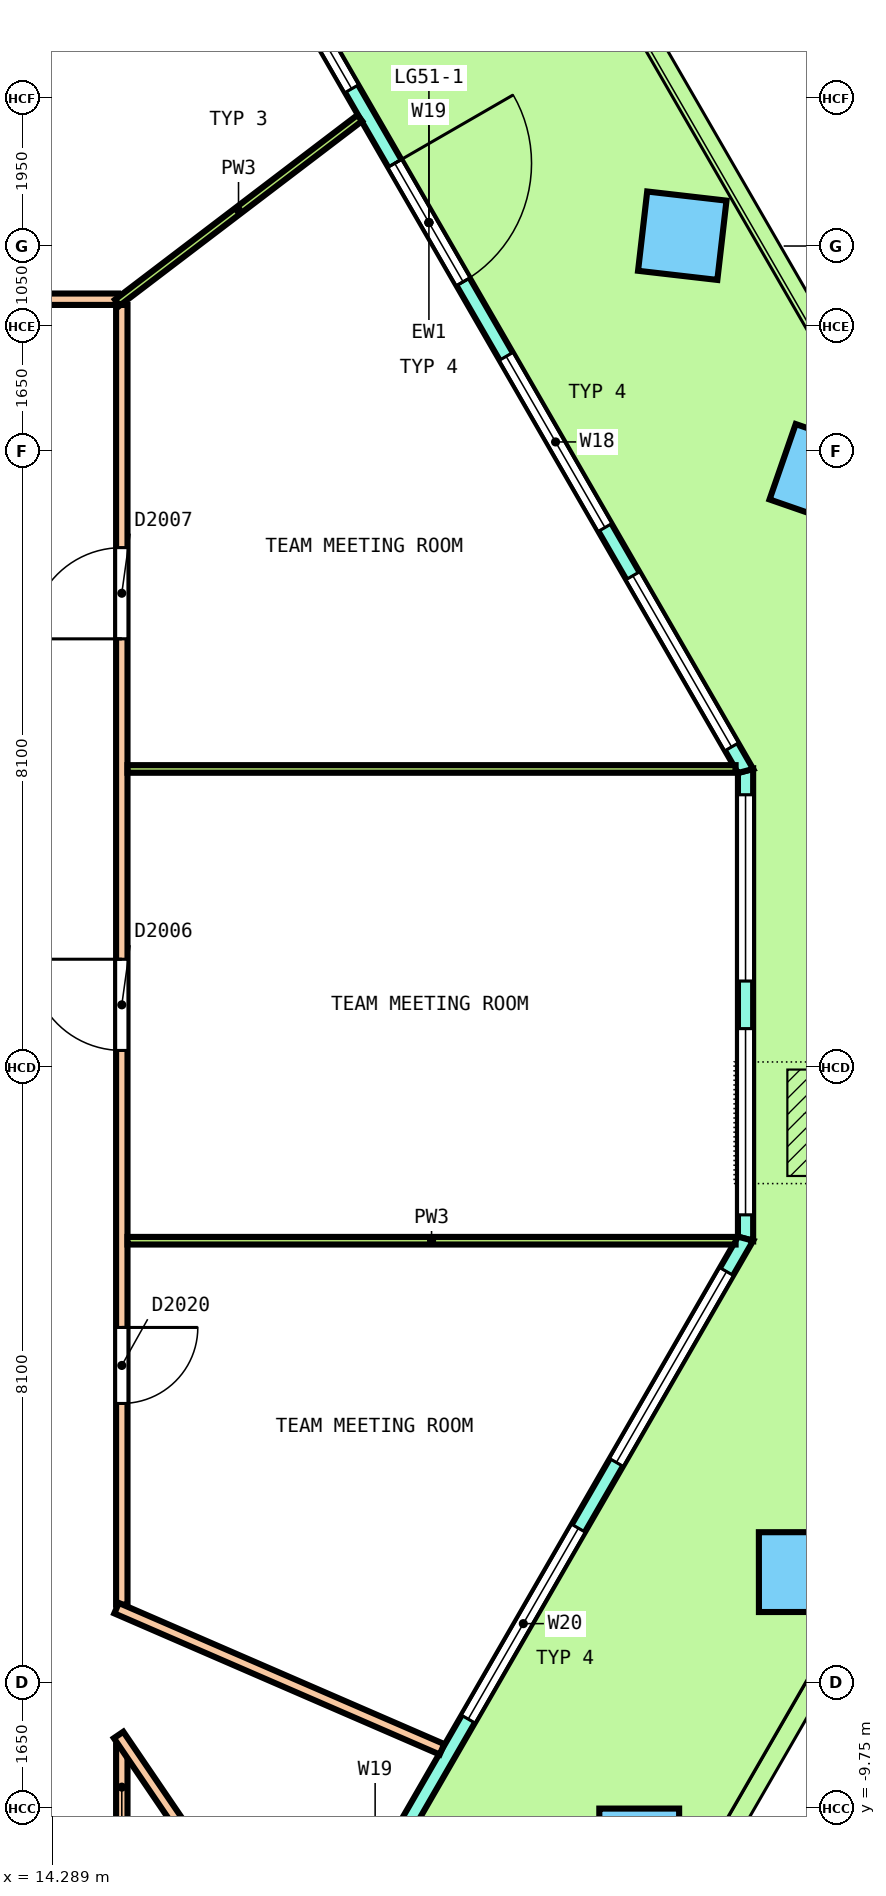
"""IFC4 building model, lengths in metres.
Left out: names, types, materials, properties, quantities, classifications, styles, units other than length and angle.
Written with IfcOpenShell. Run it as: python <this file> out.ifc"""

import sys

from ifc_helpers import new_model, si_unit, direction, frame, frame_2d, origin, origin_2d, place, context, subcontext, project, spatial, polyline, rectangle, outline, extrude, element, fill, save


model = new_model("IFC4")
c1 = context("Model", 3, precision=1e-05, world=origin(), true_north=direction((0.0, 1.0)))
c2 = subcontext(c1, "Body", "Model", "MODEL_VIEW")
j1 = project(units=[si_unit("LENGTHUNIT", "METRE"), si_unit("PLANEANGLEUNIT", "RADIAN")], contexts=[c1])
p1 = place(None, origin())
s1 = spatial("IfcSite", under=j1, at=p1, CompositionType="ELEMENT")
p2 = place(p1, origin())
s2 = spatial("IfcBuilding", under=s1, at=p2, CompositionType="ELEMENT")
p3 = place(p2, frame((0.0, 0.0, 237.4)))
s3 = spatial("IfcBuildingStorey", under=s2, at=p3, CompositionType="ELEMENT", Elevation=237.4)
p4 = place(p3, frame((24.39, 7.79, 0.0), z_axis=(0.021725676399, 0.025134936388, 0.999447962606), x_axis=(-0.500488924466, 0.86567442941, -0.010891223664)))
e1 = element("IfcColumn", 1, at=p4, inside=s3, PredefinedType="COLUMN", context=c2, shape_type="SweptSolid", body=[
    extrude(rectangle(XDim=1.05, YDim=1.05, at=origin_2d()), origin(), (0.0, 0.0, 1.0), 3.652),
])
p5 = place(p3, frame((22.573, 10.936, 0.0), z_axis=(0.025403639223, 0.018852174371, 0.999499500068), x_axis=(-0.500083888167, 0.865969385556, -0.003623268626)))
e2 = element("IfcColumn", 2, at=p5, inside=s3, PredefinedType="COLUMN", context=c2, shape_type="SweptSolid", body=[
    extrude(rectangle(XDim=1.05, YDim=1.05, at=origin_2d()), origin(), (0.0, 0.0, 1.0), 3.652),
])
p6 = place(p3, frame((22.008, -10.282, 0.0), z_axis=(0.003611703602, 0.006287039604, 0.99997371402), x_axis=(0.497890396548, 0.867209652713, -0.007250604559)))
e3 = element("IfcColumn", 3, at=p6, inside=s3, PredefinedType="COLUMN", context=c2, shape_type="SweptSolid", body=[
    extrude(rectangle(XDim=1.05, YDim=1.05, at=origin_2d()), origin(), (0.0, 0.0, 1.0), 3.65),
])
p7 = place(p3, frame((24.107, -6.646, 0.0), z_axis=(0.010899694483, 0.018857140148, 0.999762774325), x_axis=(0.499728940012, 0.865907957958, -0.021780607409)))
e4 = element("IfcColumn", 4, at=p7, inside=s3, PredefinedType="COLUMN", context=c2, shape_type="SweptSolid", body=[
    extrude(rectangle(XDim=1.05, YDim=1.05, at=origin_2d()), origin(), (0.0, 0.0, 1.0), 3.651),
])
p8 = place(p3, frame((23.406, -2.26, 0.0), z_axis=(0.0, 0.0, 1.0), x_axis=(0.0, 1.0, 0.0)))
e5 = element("IfcWall", 5, at=p8, inside=s3, PredefinedType="SOLIDWALL", context=c2, shape_type="SweptSolid", body=[
    extrude(outline(polyline([(-0.027, -0.1), (1.008, -0.1), (2.042, -0.1), (3.077, -0.1), (4.111, -0.1), (5.146, -0.1), (6.18, -0.1), (6.126, 0.1), (5.11, 0.1), (4.093, 0.1), (3.077, 0.1), (2.06, 0.1), (1.043, 0.1), (0.027, 0.1), (-0.027, -0.1)])), origin(), (0.0, 0.0, 1.0), 3.7),
])
p9 = place(p8, frame((0.313, 0.0, 0.1)))
e6 = element("IfcOpeningElement", 6, at=p9, cuts=e5, PredefinedType="OPENING", context=c2, shape_type="SweptSolid", body=[
    extrude(rectangle(XDim=2.45, YDim=2.65, at=frame_2d((1.225, 1.325))), frame((0.0, 0.11, 0.0), z_axis=(0.0, -1.0, 0.0), x_axis=(1.0, 0.0, 0.0)), (0.0, 0.0, 1.0), 0.22),
])
p10 = place(p8, frame((3.39, 0.0, 0.1)))
e7 = element("IfcOpeningElement", 7, at=p10, cuts=e5, PredefinedType="OPENING", context=c2, shape_type="SweptSolid", body=[
    extrude(rectangle(XDim=2.45, YDim=2.65, at=frame_2d((1.225, 1.325))), frame((0.0, 0.11, 0.0), z_axis=(0.0, -1.0, 0.0), x_axis=(1.0, 0.0, 0.0)), (0.0, 0.0, 1.0), 0.22),
])
p11 = place(p3, frame((23.406, 3.894, 0.0), z_axis=(0.0, 0.0, 1.0), x_axis=(-0.49999683882, 0.866027228885, 0.0)))
e8 = element("IfcWall", 8, at=p11, inside=s3, PredefinedType="SOLIDWALL", context=c2, shape_type="SweptSolid", body=[
    extrude(outline(polyline([(-0.027, -0.1), (1.018, -0.1), (2.062, -0.1), (3.107, -0.1), (4.152, -0.1), (5.197, -0.1), (6.242, -0.1), (7.286, -0.1), (8.331, -0.1), (9.376, -0.1), (10.42, -0.1), (11.465, -0.1), (12.51, -0.1), (13.555, -0.1), (14.6, -0.1), (15.644, -0.1), (16.689, -0.1), (16.635, 0.1), (15.597, 0.1), (14.559, 0.1), (13.521, 0.1), (12.483, 0.1), (11.445, 0.1), (10.407, 0.1), (9.369, 0.1), (8.331, 0.1), (7.293, 0.1), (6.255, 0.1), (5.217, 0.1), (4.179, 0.1), (3.141, 0.1), (2.103, 0.1), (1.065, 0.1), (0.027, 0.1), (-0.027, -0.1)])), origin(), (0.0, 0.0, 1.0), 3.7),
])
p12 = place(p11, frame((0.366, 0.0, 0.1)))
e9 = element("IfcOpeningElement", 9, at=p12, cuts=e8, PredefinedType="OPENING", context=c2, shape_type="SweptSolid", body=[
    extrude(rectangle(XDim=2.6, YDim=2.65, at=frame_2d((1.3, 1.325))), frame((0.0, 0.11, 0.0), z_axis=(0.0, -1.0, 0.0), x_axis=(1.0, 0.0, 0.0)), (0.0, 0.0, 1.0), 0.22),
])
p13 = place(p11, frame((3.699, 0.0, 0.1)))
e10 = element("IfcOpeningElement", 10, at=p13, cuts=e8, PredefinedType="OPENING", context=c2, shape_type="SweptSolid", body=[
    extrude(rectangle(XDim=2.6, YDim=2.65, at=frame_2d((1.3, 1.325))), frame((0.0, 0.11, 0.0), z_axis=(0.0, -1.0, 0.0), x_axis=(1.0, 0.0, 0.0)), (0.0, 0.0, 1.0), 0.22),
])
p14 = place(p11, frame((7.431, 0.0, 0.0)))
e11 = element("IfcOpeningElement", 11, at=p14, cuts=e8, PredefinedType="OPENING", context=c2, shape_type="SweptSolid", body=[
    extrude(rectangle(XDim=1.8, YDim=2.4, at=frame_2d((0.9, 1.2))), frame((0.0, 0.11, 0.0), z_axis=(0.0, -1.0, 0.0), x_axis=(1.0, 0.0, 0.0)), (0.0, 0.0, 1.0), 0.22),
])
p15 = place(p11, frame((7.431, 0.0, 2.55)))
e12 = element("IfcOpeningElement", 12, at=p15, cuts=e8, PredefinedType="OPENING", context=c2, shape_type="SweptSolid", body=[
    extrude(rectangle(XDim=1.8, YDim=0.2, at=frame_2d((0.9, 0.1))), frame((0.0, 0.11, 0.0), z_axis=(0.0, -1.0, 0.0), x_axis=(1.0, 0.0, 0.0)), (0.0, 0.0, 1.0), 0.22),
])
p16 = place(p11, frame((10.364, 0.0, 0.1)))
e13 = element("IfcOpeningElement", 13, at=p16, cuts=e8, PredefinedType="OPENING", context=c2, shape_type="SweptSolid", body=[
    extrude(rectangle(XDim=2.6, YDim=2.65, at=frame_2d((1.3, 1.325))), frame((0.0, 0.11, 0.0), z_axis=(0.0, -1.0, 0.0), x_axis=(1.0, 0.0, 0.0)), (0.0, 0.0, 1.0), 0.22),
])
p17 = place(p11, frame((13.696, 0.0, 0.1)))
e14 = element("IfcOpeningElement", 14, at=p17, cuts=e8, PredefinedType="OPENING", context=c2, shape_type="SweptSolid", body=[
    extrude(rectangle(XDim=2.6, YDim=2.65, at=frame_2d((1.3, 1.325))), frame((0.0, 0.11, 0.0), z_axis=(0.0, -1.0, 0.0), x_axis=(1.0, 0.0, 0.0)), (0.0, 0.0, 1.0), 0.22),
])
p18 = place(p3, frame((13.66, -19.141, 0.0), z_axis=(0.0, 0.0, 1.0), x_axis=(0.500001086243, 0.866024776641, 0.0)))
e15 = element("IfcWall", 15, at=p18, inside=s3, PredefinedType="SOLIDWALL", context=c2, shape_type="SweptSolid", body=[
    extrude(outline(polyline([(-0.027, -0.1), (1.002, -0.1), (2.031, -0.1), (3.059, -0.1), (4.088, -0.1), (5.117, -0.1), (6.146, -0.1), (7.175, -0.1), (8.203, -0.1), (9.232, -0.1), (10.261, -0.1), (11.29, -0.1), (12.318, -0.1), (13.347, -0.1), (14.376, -0.1), (15.405, -0.1), (16.433, -0.1), (17.462, -0.1), (18.491, -0.1), (19.52, -0.1), (19.466, 0.1), (18.443, 0.1), (17.42, 0.1), (16.396, 0.1), (15.373, 0.1), (14.35, 0.1), (13.327, 0.1), (12.304, 0.1), (11.281, 0.1), (10.258, 0.1), (9.235, 0.1), (8.212, 0.1), (7.188, 0.1), (6.166, 0.1), (5.142, 0.1), (4.119, 0.1), (3.096, 0.1), (2.073, 0.1), (1.05, 0.1), (0.027, 0.1), (-0.027, -0.1)])), origin(), (0.0, 0.0, 1.0), 3.7),
])
p19 = place(p18, frame((0.499, 0.0, 0.1)))
e16 = element("IfcOpeningElement", 16, at=p19, cuts=e15, PredefinedType="OPENING", context=c2, shape_type="SweptSolid", body=[
    extrude(rectangle(XDim=2.9, YDim=2.65, at=frame_2d((1.45, 1.325))), frame((0.0, 0.11, 0.0), z_axis=(0.0, -1.0, 0.0), x_axis=(1.0, 0.0, 0.0)), (0.0, 0.0, 1.0), 0.22),
])
p20 = place(p18, frame((4.398, 0.0, 0.1)))
e17 = element("IfcOpeningElement", 17, at=p20, cuts=e15, PredefinedType="OPENING", context=c2, shape_type="SweptSolid", body=[
    extrude(rectangle(XDim=2.9, YDim=2.65, at=frame_2d((1.45, 1.325))), frame((0.0, 0.11, 0.0), z_axis=(0.0, -1.0, 0.0), x_axis=(1.0, 0.0, 0.0)), (0.0, 0.0, 1.0), 0.22),
])
p21 = place(p18, frame((8.846, 0.0, 0.0)))
e18 = element("IfcOpeningElement", 18, at=p21, cuts=e15, PredefinedType="OPENING", context=c2, shape_type="SweptSolid", body=[
    extrude(rectangle(XDim=1.8, YDim=2.4, at=frame_2d((0.9, 1.2))), frame((0.0, 0.11, 0.0), z_axis=(0.0, -1.0, 0.0), x_axis=(1.0, 0.0, 0.0)), (0.0, 0.0, 1.0), 0.22),
])
p22 = place(p18, frame((8.846, 0.0, 2.55)))
e19 = element("IfcOpeningElement", 19, at=p22, cuts=e15, PredefinedType="OPENING", context=c2, shape_type="SweptSolid", body=[
    extrude(rectangle(XDim=1.8, YDim=0.2, at=frame_2d((0.9, 0.1))), frame((0.0, 0.11, 0.0), z_axis=(0.0, -1.0, 0.0), x_axis=(1.0, 0.0, 0.0)), (0.0, 0.0, 1.0), 0.22),
])
p23 = place(p18, frame((12.195, 0.0, 0.1)))
e20 = element("IfcOpeningElement", 20, at=p23, cuts=e15, PredefinedType="OPENING", context=c2, shape_type="SweptSolid", body=[
    extrude(rectangle(XDim=2.9, YDim=2.65, at=frame_2d((1.45, 1.325))), frame((0.0, 0.11, 0.0), z_axis=(0.0, -1.0, 0.0), x_axis=(1.0, 0.0, 0.0)), (0.0, 0.0, 1.0), 0.22),
])
p24 = place(p18, frame((16.094, 0.0, 0.1)))
e21 = element("IfcOpeningElement", 21, at=p24, cuts=e15, PredefinedType="OPENING", context=c2, shape_type="SweptSolid", body=[
    extrude(rectangle(XDim=2.9, YDim=2.65, at=frame_2d((1.45, 1.325))), frame((0.0, 0.11, 0.0), z_axis=(0.0, -1.0, 0.0), x_axis=(1.0, 0.0, 0.0)), (0.0, 0.0, 1.0), 0.22),
])
p25 = place(p3, frame((15.2, -10.025, 0.0), z_axis=(0.0, 0.0, 1.0), x_axis=(0.0, 1.0, 0.0)))
e22 = element("IfcWall", 22, at=p25, inside=s3, PredefinedType="PARTITIONING", context=c2, shape_type="SweptSolid", body=[
    extrude(rectangle(XDim=1.1, YDim=0.15, at=frame_2d((0.55, 0.0))), origin(), (0.0, 0.0, 1.0), 3.7),
])
p26 = place(p3, frame((15.2, -7.075, 0.0), z_axis=(0.0, 0.0, 1.0), x_axis=(0.0, 1.0, 0.0)))
e23 = element("IfcWall", 23, at=p26, inside=s3, PredefinedType="PARTITIONING", context=c2, shape_type="SweptSolid", body=[
    extrude(rectangle(XDim=17.1, YDim=0.15, at=frame_2d((8.55, 0.0))), origin(), (0.0, 0.0, 1.0), 2.8),
])
p27 = place(p26, frame((7.292, 0.0, 0.0)))
e24 = element("IfcOpeningElement", 24, at=p27, cuts=e23, PredefinedType="OPENING", context=c2, shape_type="SweptSolid", body=[
    extrude(rectangle(XDim=1.2, YDim=2.1, at=frame_2d((0.6, 1.05))), frame((0.0, 0.085, 0.0), z_axis=(0.0, -1.0, 0.0), x_axis=(1.0, 0.0, 0.0)), (0.0, 0.0, 1.0), 0.17),
])
p28 = place(p26, frame((12.707, 0.0, 0.0)))
e25 = element("IfcOpeningElement", 25, at=p28, cuts=e23, PredefinedType="OPENING", context=c2, shape_type="SweptSolid", body=[
    extrude(rectangle(XDim=1.2, YDim=2.1, at=frame_2d((0.6, 1.05))), frame((0.0, 0.085, 0.0), z_axis=(0.0, -1.0, 0.0), x_axis=(1.0, 0.0, 0.0)), (0.0, 0.0, 1.0), 0.17),
])
p29 = place(p26, frame((2.648, 0.0, 0.0)))
e26 = element("IfcOpeningElement", 26, at=p29, cuts=e23, PredefinedType="OPENING", context=c2, shape_type="SweptSolid", body=[
    extrude(rectangle(XDim=1.0, YDim=2.1, at=frame_2d((0.5, 1.05))), frame((0.0, 0.085, 0.0), z_axis=(0.0, -1.0, 0.0), x_axis=(1.0, 0.0, 0.0)), (0.0, 0.0, 1.0), 0.17),
])
p30 = place(p3, frame((-15.125, 10.1, 0.0), z_axis=(0.0, 0.0, 1.0), x_axis=(1.0, 0.0, 0.0)))
e27 = element("IfcWall", 27, at=p30, inside=s3, PredefinedType="PARTITIONING", context=c2, shape_type="SweptSolid", body=[
    extrude(rectangle(XDim=30.275, YDim=0.15, at=frame_2d((15.137, 0.0))), origin(), (0.0, 0.0, 1.0), 2.8),
])
p31 = place(p30, frame((28.004, 0.0, 0.0)))
e28 = element("IfcOpeningElement", 28, at=p31, cuts=e27, PredefinedType="OPENING", context=c2, shape_type="SweptSolid", body=[
    extrude(rectangle(XDim=1.0, YDim=2.1, at=frame_2d((0.5, 1.05))), frame((0.0, 0.085, 0.0), z_axis=(0.0, -1.0, 0.0), x_axis=(1.0, 0.0, 0.0)), (0.0, 0.0, 1.0), 0.17),
])
p32 = place(p30, frame((21.041, 0.0, 0.0)))
e29 = element("IfcOpeningElement", 29, at=p32, cuts=e27, PredefinedType="OPENING", context=c2, shape_type="SweptSolid", body=[
    extrude(rectangle(XDim=1.0, YDim=2.1, at=frame_2d((0.5, 1.05))), frame((0.0, 0.085, 0.0), z_axis=(0.0, -1.0, 0.0), x_axis=(1.0, 0.0, 0.0)), (0.0, 0.0, 1.0), 0.17),
])
p33 = place(p30, frame((4.28, 0.0, 0.0)))
e30 = element("IfcOpeningElement", 30, at=p33, cuts=e27, PredefinedType="OPENING", context=c2, shape_type="SweptSolid", body=[
    extrude(rectangle(XDim=1.2, YDim=2.1, at=frame_2d((0.6, 1.05))), frame((0.0, 0.085, 0.0), z_axis=(0.0, -1.0, 0.0), x_axis=(1.0, 0.0, 0.0)), (0.0, 0.0, 1.0), 0.17),
])
p34 = place(p3, frame((15.158, -8.788, 0.0), z_axis=(0.0, 0.0, 1.0), x_axis=(0.562208188703, -0.82699573914, 0.0)))
e31 = element("IfcWall", 31, at=p34, inside=s3, PredefinedType="PARTITIONING", context=c2, shape_type="SweptSolid", body=[
    extrude(rectangle(XDim=4.197, YDim=0.15, at=frame_2d((2.099, 0.0))), origin(), (0.0, 0.0, 1.0), 2.8),
])
p35 = place(p3, frame((15.131, -7.12, 0.0), z_axis=(0.0, 0.0, 1.0), x_axis=(0.917412410679, -0.397937769924, 0.0)))
e32 = element("IfcWall", 32, at=p35, inside=s3, PredefinedType="PARTITIONING", context=c2, shape_type="SweptSolid", body=[
    extrude(rectangle(XDim=4.667, YDim=0.15, at=frame_2d((2.333, 0.0))), origin(), (0.0, 0.0, 1.0), 2.8),
])
for number, where, z_axis, x_axis in (
    (33, (15.275, 3.92, 0.0), (0.0, 0.0, 1.0), (1.0, 0.0, 0.0)),
    (34, (15.275, -2.286, 0.0), (0.0, 0.0, 1.0), (1.0, 0.0, 0.0)),
):
    element("IfcWall", number, at=place(p3, frame(where, z_axis=z_axis, x_axis=x_axis)), inside=s3, PredefinedType="PARTITIONING", context=c2, shape_type="SweptSolid", body=[
        extrude(rectangle(XDim=8.0, YDim=0.1, at=frame_2d((4.0, 0.0))), origin(), (0.0, 0.0, 1.0), 2.8),
    ])
p36 = place(p3, frame((15.14, 10.055, 0.0), z_axis=(0.0, 0.0, 1.0), x_axis=(0.795624550045, 0.605790042313, 0.0)))
e35 = element("IfcWall", 35, at=p36, inside=s3, PredefinedType="PARTITIONING", context=c2, shape_type="SweptSolid", body=[
    extrude(rectangle(XDim=4.01, YDim=0.1, at=frame_2d((2.005, 0.0))), origin(), (0.0, 0.0, 1.0), 2.8),
])
p37 = place(p9, origin())
e36 = element("IfcWindow", 36, at=p37, inside=s3, PartitioningType="SINGLE_PANEL", PredefinedType="WINDOW", context=c2, shape_type="SweptSolid", body=[
    extrude(rectangle(XDim=2.45, YDim=2.65, at=frame_2d((1.225, 1.325))), frame((0.0, 0.03, 0.0), z_axis=(0.0, -1.0, 0.0), x_axis=(1.0, 0.0, 0.0)), (0.0, 0.0, 1.0), 0.06),
])
fill(e6, e36)
p38 = place(p10, origin())
e37 = element("IfcWindow", 37, at=p38, inside=s3, PartitioningType="SINGLE_PANEL", PredefinedType="WINDOW", context=c2, shape_type="SweptSolid", body=[
    extrude(rectangle(XDim=2.45, YDim=2.65, at=frame_2d((1.225, 1.325))), frame((0.0, 0.03, 0.0), z_axis=(0.0, -1.0, 0.0), x_axis=(1.0, 0.0, 0.0)), (0.0, 0.0, 1.0), 0.06),
])
fill(e7, e37)
p39 = place(p12, origin())
e38 = element("IfcWindow", 38, at=p39, inside=s3, PartitioningType="SINGLE_PANEL", PredefinedType="WINDOW", context=c2, shape_type="SweptSolid", body=[
    extrude(rectangle(XDim=2.6, YDim=2.65, at=frame_2d((1.3, 1.325))), frame((0.0, 0.03, 0.0), z_axis=(0.0, -1.0, 0.0), x_axis=(1.0, 0.0, 0.0)), (0.0, 0.0, 1.0), 0.06),
])
fill(e9, e38)
p40 = place(p13, origin())
e39 = element("IfcWindow", 39, at=p40, inside=s3, PartitioningType="SINGLE_PANEL", PredefinedType="WINDOW", context=c2, shape_type="SweptSolid", body=[
    extrude(rectangle(XDim=2.6, YDim=2.65, at=frame_2d((1.3, 1.325))), frame((0.0, 0.03, 0.0), z_axis=(0.0, -1.0, 0.0), x_axis=(1.0, 0.0, 0.0)), (0.0, 0.0, 1.0), 0.06),
])
fill(e10, e39)
p41 = place(p14, origin())
e40 = element("IfcDoor", 40, at=p41, inside=s3, OperationType="DOUBLE_DOOR_SINGLE_SWING", PredefinedType="DOOR", context=c2, shape_type="SweptSolid", body=[
    extrude(rectangle(XDim=1.8, YDim=2.4, at=frame_2d((0.9, 1.2))), frame((0.0, 0.025, 0.0), z_axis=(0.0, -1.0, 0.0), x_axis=(1.0, 0.0, 0.0)), (0.0, 0.0, 1.0), 0.05),
])
fill(e11, e40)
p42 = place(p15, origin())
e41 = element("IfcWindow", 41, at=p42, inside=s3, PartitioningType="SINGLE_PANEL", PredefinedType="WINDOW", context=c2, shape_type="SweptSolid", body=[
    extrude(rectangle(XDim=1.8, YDim=0.2, at=frame_2d((0.9, 0.1))), frame((0.0, 0.03, 0.0), z_axis=(0.0, -1.0, 0.0), x_axis=(1.0, 0.0, 0.0)), (0.0, 0.0, 1.0), 0.06),
])
fill(e12, e41)
p43 = place(p16, origin())
e42 = element("IfcWindow", 42, at=p43, inside=s3, PartitioningType="SINGLE_PANEL", PredefinedType="WINDOW", context=c2, shape_type="SweptSolid", body=[
    extrude(rectangle(XDim=2.6, YDim=2.65, at=frame_2d((1.3, 1.325))), frame((0.0, 0.03, 0.0), z_axis=(0.0, -1.0, 0.0), x_axis=(1.0, 0.0, 0.0)), (0.0, 0.0, 1.0), 0.06),
])
fill(e13, e42)
p44 = place(p23, origin())
e43 = element("IfcWindow", 43, at=p44, inside=s3, PartitioningType="SINGLE_PANEL", PredefinedType="WINDOW", context=c2, shape_type="SweptSolid", body=[
    extrude(rectangle(XDim=2.9, YDim=2.65, at=frame_2d((1.45, 1.325))), frame((0.0, 0.03, 0.0), z_axis=(0.0, -1.0, 0.0), x_axis=(1.0, 0.0, 0.0)), (0.0, 0.0, 1.0), 0.06),
])
fill(e20, e43)
p45 = place(p24, origin())
e44 = element("IfcWindow", 44, at=p45, inside=s3, PartitioningType="SINGLE_PANEL", PredefinedType="WINDOW", context=c2, shape_type="SweptSolid", body=[
    extrude(rectangle(XDim=2.9, YDim=2.65, at=frame_2d((1.45, 1.325))), frame((0.0, 0.03, 0.0), z_axis=(0.0, -1.0, 0.0), x_axis=(1.0, 0.0, 0.0)), (0.0, 0.0, 1.0), 0.06),
])
fill(e21, e44)
p46 = place(p27, origin())
e45 = element("IfcDoor", 45, at=p46, inside=s3, OperationType="DOUBLE_DOOR_SINGLE_SWING", PredefinedType="DOOR", context=c2, shape_type="SweptSolid", body=[
    extrude(rectangle(XDim=1.2, YDim=2.1, at=frame_2d((0.6, 1.05))), frame((0.0, 0.025, 0.0), z_axis=(0.0, -1.0, 0.0), x_axis=(1.0, 0.0, 0.0)), (0.0, 0.0, 1.0), 0.05),
])
fill(e24, e45)
p47 = place(p28, origin())
e46 = element("IfcDoor", 46, at=p47, inside=s3, OperationType="DOUBLE_DOOR_SINGLE_SWING", PredefinedType="DOOR", context=c2, shape_type="SweptSolid", body=[
    extrude(rectangle(XDim=1.2, YDim=2.1, at=frame_2d((0.6, 1.05))), frame((0.0, 0.025, 0.0), z_axis=(0.0, -1.0, 0.0), x_axis=(1.0, 0.0, 0.0)), (0.0, 0.0, 1.0), 0.05),
])
fill(e25, e46)
p48 = place(p29, origin())
e47 = element("IfcDoor", 47, at=p48, inside=s3, OperationType="SINGLE_SWING_RIGHT", PredefinedType="DOOR", context=c2, shape_type="SweptSolid", body=[
    extrude(rectangle(XDim=1.0, YDim=2.1, at=frame_2d((0.5, 1.05))), frame((0.0, 0.025, 0.0), z_axis=(0.0, -1.0, 0.0), x_axis=(1.0, 0.0, 0.0)), (0.0, 0.0, 1.0), 0.05),
])
fill(e26, e47)
save(model, sys.argv[1])
